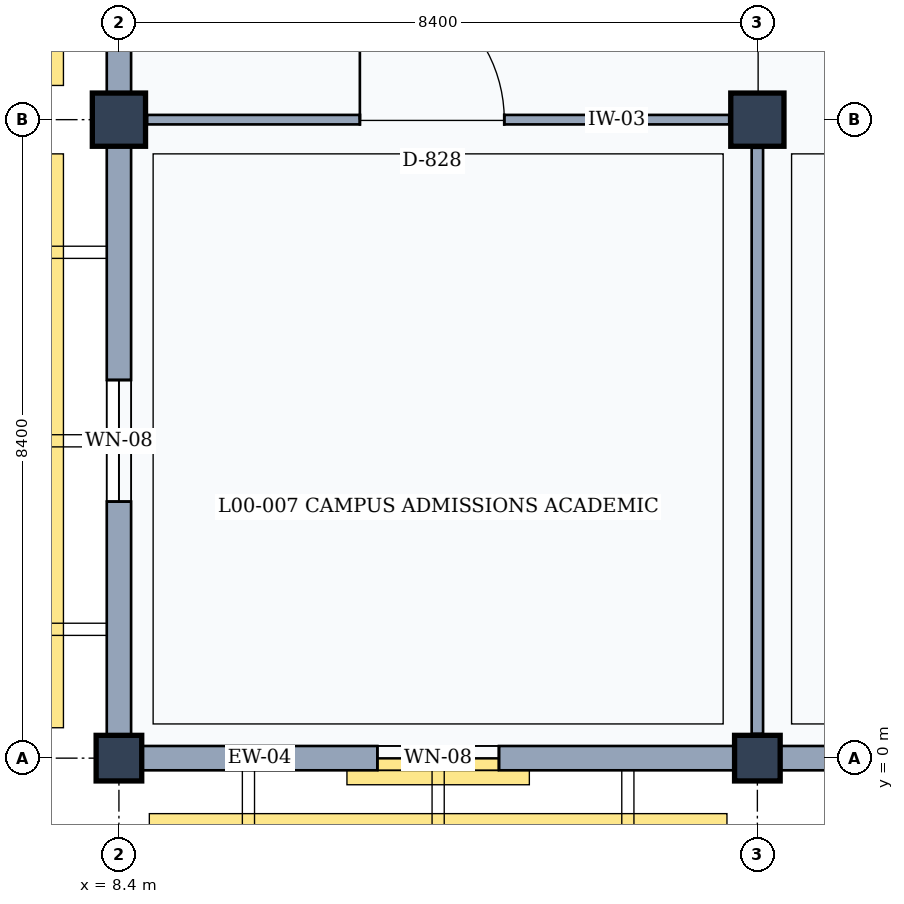
"""IFC4 building model, lengths in metres.
Left out: names, types, materials, properties, quantities, classifications, styles, units other than length and angle.
Written with IfcOpenShell. Run it as: python <this file> out.ifc"""

import sys

from ifc_helpers import new_model, si_unit, direction, frame, frame_2d, origin, origin_2d, place, context, subcontext, project, spatial, rectangle, extrude, element, fill, save


model = new_model("IFC4")
c1 = context("Model", 3, precision=1e-05, world=origin(), true_north=direction((0.0, 1.0)))
c2 = subcontext(c1, "Body", "Model", "MODEL_VIEW")
j1 = project(units=[si_unit("LENGTHUNIT", "METRE"), si_unit("PLANEANGLEUNIT", "RADIAN")], contexts=[c1])
p1 = place(None, origin())
s1 = spatial("IfcSite", under=j1, at=p1, CompositionType="ELEMENT")
p2 = place(p1, origin())
s2 = spatial("IfcBuilding", under=s1, at=p2, CompositionType="ELEMENT")
p3 = place(p2, origin())
s3 = spatial("IfcBuildingStorey", under=s2, at=p3, CompositionType="ELEMENT", Elevation=0.0)
p4 = place(p3, frame((8.4, 0.0, 0.0), z_axis=(0.0, 0.0, 1.0), x_axis=(1.0, 0.0, 0.0)))
e1 = element("IfcColumn", 1, at=p4, inside=s3, PredefinedType="COLUMN", context=c2, shape_type="SweptSolid", body=[
    extrude(rectangle(XDim=0.6, YDim=0.6, at=origin_2d()), origin(), (0.0, 0.0, 1.0), 4.8),
])
p5 = place(p3, frame((8.4, 8.4, 0.0), z_axis=(0.0, 0.0, 1.0), x_axis=(1.0, 0.0, 0.0)))
e2 = element("IfcColumn", 2, at=p5, inside=s3, PredefinedType="COLUMN", context=c2, shape_type="SweptSolid", body=[
    extrude(rectangle(XDim=0.7, YDim=0.7, at=origin_2d()), origin(), (0.0, 0.0, 1.0), 4.8),
])
p6 = place(p3, frame((16.8, 0.0, 0.0), z_axis=(0.0, 0.0, 1.0), x_axis=(1.0, 0.0, 0.0)))
e3 = element("IfcColumn", 3, at=p6, inside=s3, PredefinedType="COLUMN", context=c2, shape_type="SweptSolid", body=[
    extrude(rectangle(XDim=0.6, YDim=0.6, at=origin_2d()), origin(), (0.0, 0.0, 1.0), 4.8),
])
p7 = place(p3, frame((16.8, 8.4, 0.0), z_axis=(0.0, 0.0, 1.0), x_axis=(1.0, 0.0, 0.0)))
e4 = element("IfcColumn", 4, at=p7, inside=s3, PredefinedType="COLUMN", context=c2, shape_type="SweptSolid", body=[
    extrude(rectangle(XDim=0.7, YDim=0.7, at=origin_2d()), origin(), (0.0, 0.0, 1.0), 4.8),
])
p8 = place(p3, frame((16.5, 0.0, 0.0), z_axis=(0.0, 0.0, 1.0), x_axis=(-1.0, 0.0, 0.0)))
e5 = element("IfcWall", 5, at=p8, inside=s3, PredefinedType="SOLIDWALL", context=c2, shape_type="SweptSolid", body=[
    extrude(rectangle(XDim=7.8, YDim=0.32, at=frame_2d((3.9, 0.0))), origin(), (0.0, 0.0, 1.0), 3.96),
])
p9 = place(p8, frame((3.1, 0.0, 0.95)))
e6 = element("IfcOpeningElement", 6, at=p9, cuts=e5, PredefinedType="OPENING", context=c2, shape_type="SweptSolid", body=[
    extrude(rectangle(XDim=1.6, YDim=2.0, at=frame_2d((0.8, 1.0))), frame((0.0, 0.17, 0.0), z_axis=(0.0, -1.0, 0.0), x_axis=(1.0, 0.0, 0.0)), (0.0, 0.0, 1.0), 0.34),
])
p10 = place(p3, frame((8.4, 0.3, 0.0), z_axis=(0.0, 0.0, 1.0), x_axis=(0.0, 1.0, 0.0)))
e7 = element("IfcWall", 7, at=p10, inside=s3, PredefinedType="SOLIDWALL", context=c2, shape_type="SweptSolid", body=[
    extrude(rectangle(XDim=7.75, YDim=0.32, at=frame_2d((3.875, 0.0))), origin(), (0.0, 0.0, 1.0), 3.96),
])
p11 = place(p10, frame((3.075, 0.0, 0.95)))
e8 = element("IfcOpeningElement", 8, at=p11, cuts=e7, PredefinedType="OPENING", context=c2, shape_type="SweptSolid", body=[
    extrude(rectangle(XDim=1.6, YDim=2.0, at=frame_2d((0.8, 1.0))), frame((0.0, 0.17, 0.0), z_axis=(0.0, -1.0, 0.0), x_axis=(1.0, 0.0, 0.0)), (0.0, 0.0, 1.0), 0.34),
])
p12 = place(p3, frame((8.4, 8.75, 0.0), z_axis=(0.0, 0.0, 1.0), x_axis=(0.0, 1.0, 0.0)))
e9 = element("IfcWall", 9, at=p12, inside=s3, PredefinedType="SOLIDWALL", context=c2, shape_type="SweptSolid", body=[
    extrude(rectangle(XDim=7.7, YDim=0.32, at=frame_2d((3.85, 0.0))), origin(), (0.0, 0.0, 1.0), 3.96),
])
p13 = place(p12, frame((2.45, 0.0, 0.95)))
e10 = element("IfcOpeningElement", 10, at=p13, cuts=e9, PredefinedType="OPENING", context=c2, shape_type="SweptSolid", body=[
    extrude(rectangle(XDim=2.8, YDim=1.65, at=frame_2d((1.4, 0.825))), frame((0.0, 0.17, 0.0), z_axis=(0.0, -1.0, 0.0), x_axis=(1.0, 0.0, 0.0)), (0.0, 0.0, 1.0), 0.34),
])
p14 = place(p3, frame((24.9, 0.0, 0.0), z_axis=(0.0, 0.0, 1.0), x_axis=(-1.0, 0.0, 0.0)))
e11 = element("IfcWall", 11, at=p14, inside=s3, PredefinedType="SOLIDWALL", context=c2, shape_type="SweptSolid", body=[
    extrude(rectangle(XDim=7.8, YDim=0.32, at=frame_2d((3.9, 0.0))), origin(), (0.0, 0.0, 1.0), 3.96),
])
p15 = place(p14, frame((2.9, 0.0, 0.0)))
e12 = element("IfcOpeningElement", 12, at=p15, cuts=e11, PredefinedType="OPENING", context=c2, shape_type="SweptSolid", body=[
    extrude(rectangle(XDim=2.0, YDim=2.3, at=frame_2d((1.0, 1.15))), frame((0.0, 0.17, 0.0), z_axis=(0.0, -1.0, 0.0), x_axis=(1.0, 0.0, 0.0)), (0.0, 0.0, 1.0), 0.34),
])
p16 = place(p3, frame((16.8, 0.32, 0.0), z_axis=(0.0, 0.0, 1.0), x_axis=(0.0, 1.0, 0.0)))
e13 = element("IfcWall", 13, at=p16, inside=s3, PredefinedType="PARTITIONING", context=c2, shape_type="SweptSolid", body=[
    extrude(rectangle(XDim=7.71, YDim=0.15, at=frame_2d((3.855, 0.0))), origin(), (0.0, 0.0, 1.0), 3.92),
])
p17 = place(p3, frame((8.77, 8.4, 0.0), z_axis=(0.0, 0.0, 1.0), x_axis=(1.0, 0.0, 0.0)))
e14 = element("IfcWall", 14, at=p17, inside=s3, PredefinedType="PARTITIONING", context=c2, shape_type="SweptSolid", body=[
    extrude(rectangle(XDim=7.66, YDim=0.125, at=frame_2d((3.83, 0.0))), origin(), (0.0, 0.0, 1.0), 3.86),
])
p18 = place(p17, frame((2.8, 0.0, 0.0)))
e15 = element("IfcOpeningElement", 15, at=p18, cuts=e14, PredefinedType="OPENING", context=c2, shape_type="SweptSolid", body=[
    extrude(rectangle(XDim=1.9, YDim=2.4, at=frame_2d((0.95, 1.2))), frame((0.0, 0.073, 0.0), z_axis=(0.0, -1.0, 0.0), x_axis=(1.0, 0.0, 0.0)), (0.0, 0.0, 1.0), 0.145),
])
p19 = place(p9, origin())
e16 = element("IfcWindow", 16, at=p19, inside=s3, PartitioningType="SINGLE_PANEL", PredefinedType="WINDOW", context=c2, shape_type="SweptSolid", body=[
    extrude(rectangle(XDim=1.6, YDim=2.0, at=frame_2d((0.8, 1.0))), frame((0.0, 0.03, 0.0), z_axis=(0.0, -1.0, 0.0), x_axis=(1.0, 0.0, 0.0)), (0.0, 0.0, 1.0), 0.06),
])
fill(e6, e16)
p20 = place(p11, origin())
e17 = element("IfcWindow", 17, at=p20, inside=s3, PartitioningType="SINGLE_PANEL", PredefinedType="WINDOW", context=c2, shape_type="SweptSolid", body=[
    extrude(rectangle(XDim=1.6, YDim=2.0, at=frame_2d((0.8, 1.0))), frame((0.0, 0.03, 0.0), z_axis=(0.0, -1.0, 0.0), x_axis=(1.0, 0.0, 0.0)), (0.0, 0.0, 1.0), 0.06),
])
fill(e8, e17)
p21 = place(p18, origin())
e18 = element("IfcDoor", 18, at=p21, inside=s3, OperationType="SINGLE_SWING_LEFT", PredefinedType="DOOR", context=c2, shape_type="SweptSolid", body=[
    extrude(rectangle(XDim=1.9, YDim=2.4, at=frame_2d((0.95, 1.2))), frame((0.0, 0.025, 0.0), z_axis=(0.0, -1.0, 0.0), x_axis=(1.0, 0.0, 0.0)), (0.0, 0.0, 1.0), 0.05),
])
fill(e15, e18)
save(model, sys.argv[1])
